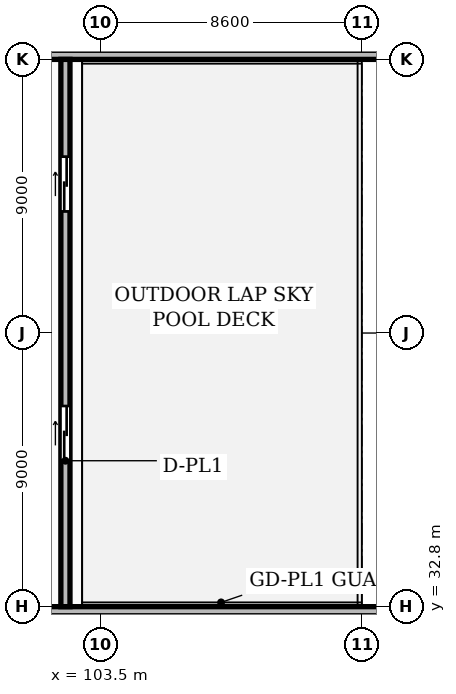
"""IFC4 building model, lengths in metres.
Left out: names, types, materials, properties, quantities, classifications, styles, units other than length and angle.
Written with IfcOpenShell. Run it as: python <this file> out.ifc"""

import sys

from ifc_helpers import new_model, si_unit, direction, frame, frame_2d, origin, place, context, subcontext, project, spatial, rectangle, extrude, element, fill, save


model = new_model("IFC4")
c1 = context("Model", 3, precision=1e-05, world=origin(), true_north=direction((0.0, 1.0)))
c2 = subcontext(c1, "Body", "Model", "MODEL_VIEW")
j1 = project(units=[si_unit("LENGTHUNIT", "METRE"), si_unit("PLANEANGLEUNIT", "RADIAN")], contexts=[c1])
p1 = place(None, origin())
s1 = spatial("IfcSite", under=j1, at=p1, CompositionType="ELEMENT")
p2 = place(p1, origin())
s2 = spatial("IfcBuilding", under=s1, at=p2, CompositionType="ELEMENT")
p3 = place(p2, frame((0.0, 0.0, 153.7)))
s3 = spatial("IfcBuildingStorey", under=s2, at=p3, CompositionType="ELEMENT", Elevation=153.7)
p4 = place(p3, frame((57.6, 50.95, 0.0), z_axis=(0.0, 0.0, 1.0), x_axis=(1.0, 0.0, 0.0)))
e1 = element("IfcWall", 1, at=p4, inside=s3, PredefinedType="STANDARD", context=c2, shape_type="SweptSolid", body=[
    extrude(rectangle(XDim=73.0, YDim=0.3, at=frame_2d((36.5, 0.0))), origin(), (0.0, 0.0, 1.0), 3.32),
])
p5 = place(p4, frame((15.225, 0.0, 0.85)))
e2 = element("IfcOpeningElement", 2, at=p5, cuts=e1, PredefinedType="OPENING", context=c2, shape_type="SweptSolid", body=[
    extrude(rectangle(XDim=1.8, YDim=1.8, at=frame_2d((0.9, 0.9))), frame((0.0, 0.16, 0.0), z_axis=(0.0, -1.0, 0.0), x_axis=(1.0, 0.0, 0.0)), (0.0, 0.0, 1.0), 0.32),
])
p6 = place(p4, frame((58.575, 0.0, 0.85)))
e3 = element("IfcOpeningElement", 3, at=p6, cuts=e1, PredefinedType="OPENING", context=c2, shape_type="SweptSolid", body=[
    extrude(rectangle(XDim=1.8, YDim=1.8, at=frame_2d((0.9, 0.9))), frame((0.0, 0.16, 0.0), z_axis=(0.0, -1.0, 0.0), x_axis=(1.0, 0.0, 0.0)), (0.0, 0.0, 1.0), 0.32),
])
p7 = place(p4, frame((33.45, 0.0, 0.0)))
e4 = element("IfcOpeningElement", 4, at=p7, cuts=e1, PredefinedType="OPENING", context=c2, shape_type="SweptSolid", body=[
    extrude(rectangle(XDim=1.1, YDim=2.1, at=frame_2d((0.55, 1.05))), frame((0.0, 0.16, 0.0), z_axis=(0.0, -1.0, 0.0), x_axis=(1.0, 0.0, 0.0)), (0.0, 0.0, 1.0), 0.32),
])
p8 = place(p3, frame((130.7, 32.65, 0.0), z_axis=(0.0, 0.0, 1.0), x_axis=(-1.0, 0.0, 0.0)))
e5 = element("IfcWall", 5, at=p8, inside=s3, PredefinedType="STANDARD", context=c2, shape_type="SweptSolid", body=[
    extrude(rectangle(XDim=58.0, YDim=0.3, at=frame_2d((29.0, 0.0))), origin(), (0.0, 0.0, 1.0), 3.32),
])
p9 = place(p8, frame((50.125, 0.0, 0.85)))
e6 = element("IfcOpeningElement", 6, at=p9, cuts=e5, PredefinedType="OPENING", context=c2, shape_type="SweptSolid", body=[
    extrude(rectangle(XDim=1.8, YDim=1.8, at=frame_2d((0.9, 0.9))), frame((0.0, 0.16, 0.0), z_axis=(0.0, -1.0, 0.0), x_axis=(1.0, 0.0, 0.0)), (0.0, 0.0, 1.0), 0.32),
])
p10 = place(p8, frame((6.775, 0.0, 0.85)))
e7 = element("IfcOpeningElement", 7, at=p10, cuts=e5, PredefinedType="OPENING", context=c2, shape_type="SweptSolid", body=[
    extrude(rectangle(XDim=1.8, YDim=1.8, at=frame_2d((0.9, 0.9))), frame((0.0, 0.16, 0.0), z_axis=(0.0, -1.0, 0.0), x_axis=(1.0, 0.0, 0.0)), (0.0, 0.0, 1.0), 0.32),
])
p11 = place(p8, frame((38.0, 0.0, 0.0)))
e8 = element("IfcOpeningElement", 8, at=p11, cuts=e5, PredefinedType="OPENING", context=c2, shape_type="SweptSolid", body=[
    extrude(rectangle(XDim=1.1, YDim=2.1, at=frame_2d((0.55, 1.05))), frame((0.0, 0.16, 0.0), z_axis=(0.0, -1.0, 0.0), x_axis=(1.0, 0.0, 0.0)), (0.0, 0.0, 1.0), 0.32),
])
p12 = place(p3, frame((102.35, 32.8, 0.0), z_axis=(0.0, 0.0, 1.0), x_axis=(0.0, 1.0, 0.0)))
e9 = element("IfcWall", 9, at=p12, inside=s3, PredefinedType="STANDARD", context=c2, shape_type="SweptSolid", body=[
    extrude(rectangle(XDim=18.0, YDim=0.3, at=frame_2d((9.0, 0.0))), origin(), (0.0, 0.0, 1.0), 3.32),
])
p13 = place(p12, frame((4.8, 0.0, 0.0)))
e10 = element("IfcOpeningElement", 10, at=p13, cuts=e9, PredefinedType="OPENING", context=c2, shape_type="SweptSolid", body=[
    extrude(rectangle(XDim=1.8, YDim=2.3, at=frame_2d((0.9, 1.15))), frame((0.0, 0.16, 0.0), z_axis=(0.0, -1.0, 0.0), x_axis=(1.0, 0.0, 0.0)), (0.0, 0.0, 1.0), 0.32),
])
p14 = place(p12, frame((13.0, 0.0, 0.0)))
e11 = element("IfcOpeningElement", 11, at=p14, cuts=e9, PredefinedType="OPENING", context=c2, shape_type="SweptSolid", body=[
    extrude(rectangle(XDim=1.8, YDim=2.3, at=frame_2d((0.9, 1.15))), frame((0.0, 0.16, 0.0), z_axis=(0.0, -1.0, 0.0), x_axis=(1.0, 0.0, 0.0)), (0.0, 0.0, 1.0), 0.32),
])
p15 = place(p13, origin())
e12 = element("IfcDoor", 12, at=p15, inside=s3, OperationType="DOUBLE_DOOR_SLIDING", PredefinedType="DOOR", context=c2, shape_type="SweptSolid", body=[
    extrude(rectangle(XDim=1.8, YDim=2.3, at=frame_2d((0.9, 1.15))), frame((0.0, 0.025, 0.0), z_axis=(0.0, -1.0, 0.0), x_axis=(1.0, 0.0, 0.0)), (0.0, 0.0, 1.0), 0.05),
])
fill(e10, e12)
p16 = place(p14, origin())
e13 = element("IfcDoor", 13, at=p16, inside=s3, OperationType="DOUBLE_DOOR_SLIDING", PredefinedType="DOOR", context=c2, shape_type="SweptSolid", body=[
    extrude(rectangle(XDim=1.8, YDim=2.3, at=frame_2d((0.9, 1.15))), frame((0.0, 0.025, 0.0), z_axis=(0.0, -1.0, 0.0), x_axis=(1.0, 0.0, 0.0)), (0.0, 0.0, 1.0), 0.05),
])
fill(e11, e13)
save(model, sys.argv[1])
